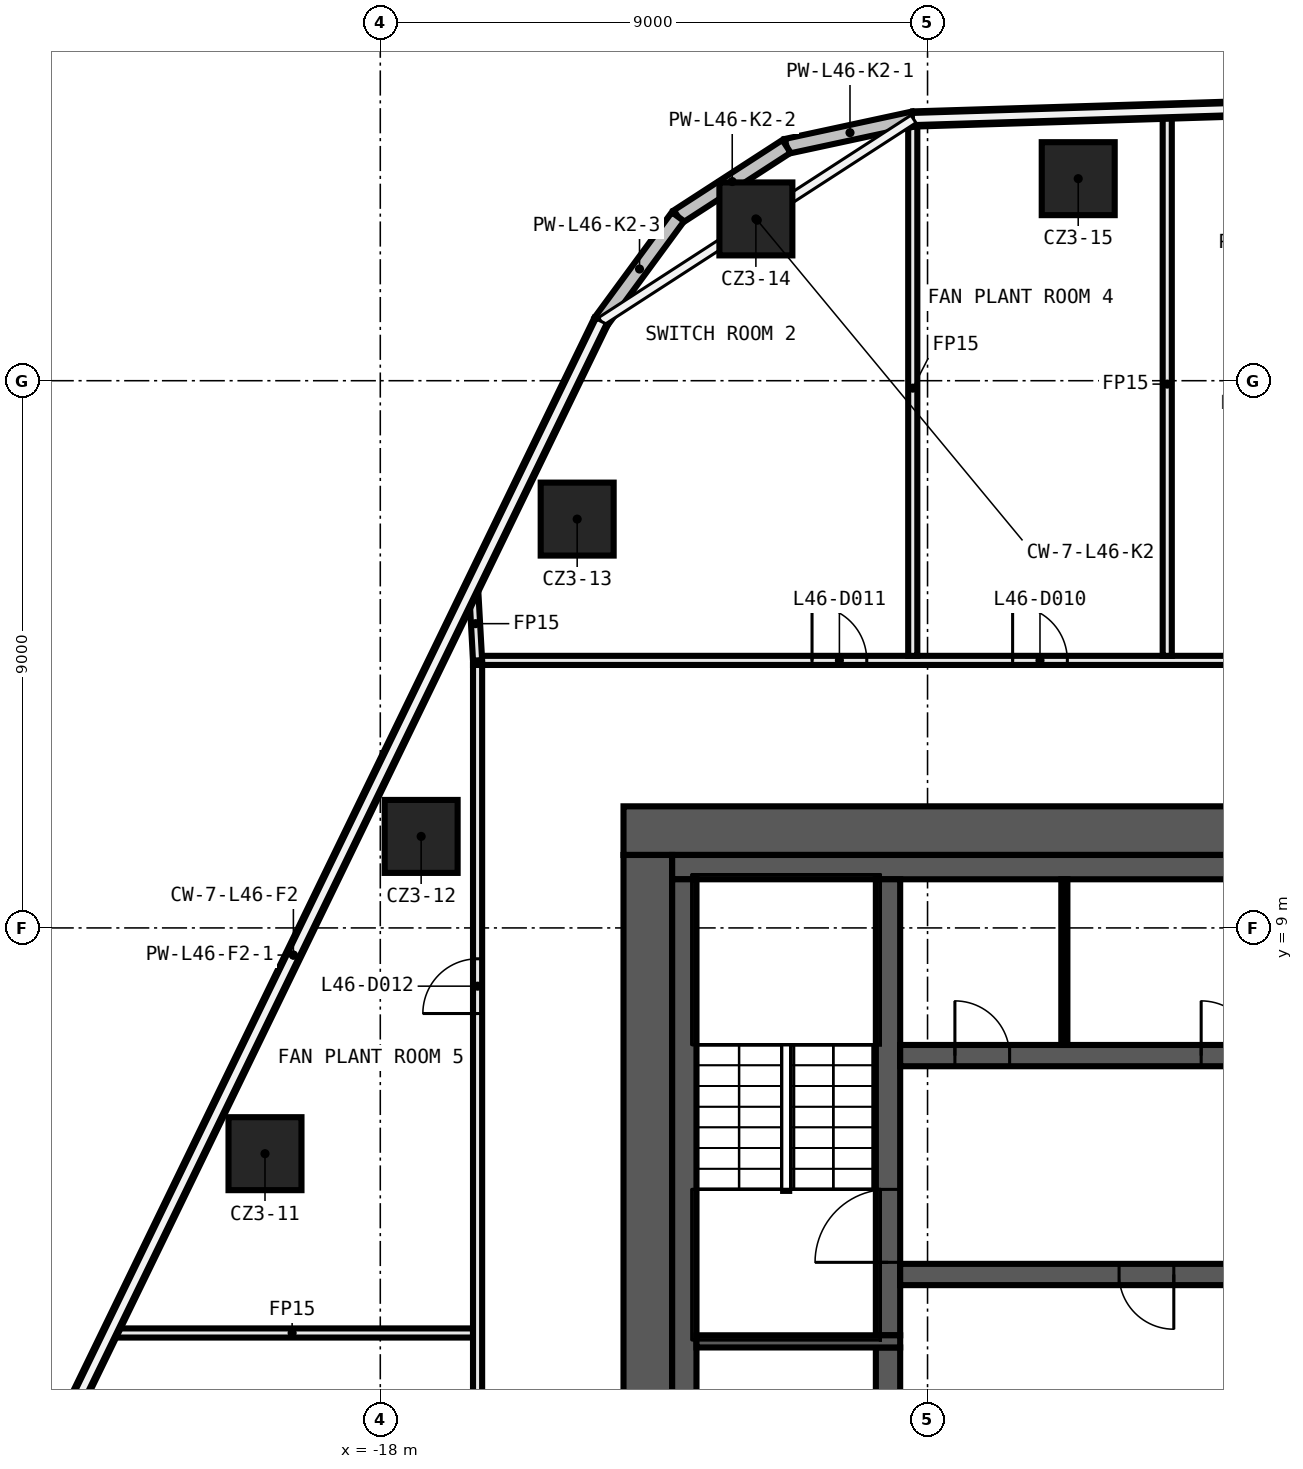
"""IFC4 building model, lengths in metres.
Left out: names, types, materials, properties, quantities, classifications, styles, units other than length and angle.
Written with IfcOpenShell. Run it as: python <this file> out.ifc"""

import sys

from ifc_helpers import new_model, si_unit, direction, frame, frame_2d, origin, origin_2d, place, context, subcontext, project, spatial, rectangle, extrude, element, fill, save


model = new_model("IFC4")
c1 = context("Model", 3, precision=1e-05, world=origin(), true_north=direction((0.0, 1.0)))
c2 = subcontext(c1, "Body", "Model", "MODEL_VIEW")
j1 = project(units=[si_unit("LENGTHUNIT", "METRE"), si_unit("PLANEANGLEUNIT", "RADIAN")], contexts=[c1])
p1 = place(None, origin())
s1 = spatial("IfcSite", under=j1, at=p1, CompositionType="ELEMENT")
p2 = place(p1, origin())
s2 = spatial("IfcBuilding", under=s1, at=p2, CompositionType="ELEMENT")
p3 = place(p2, frame((0.0, 0.0, 220.6)))
s3 = spatial("IfcBuildingStorey", under=s2, at=p3, CompositionType="ELEMENT", Elevation=220.6)
for number, where, z_axis, x_axis in (
    (1, (-19.896, 5.287, 0.0), (0.0, 0.0, 1.0), (1.0, 0.0, 0.0)),
    (2, (-17.328, 10.505, 0.0), (0.0, 0.0, 1.0), (1.0, 0.0, 0.0)),
    (3, (-14.762, 15.724, 0.0), (0.0, 0.0, 1.0), (1.0, 0.0, 0.0)),
    (4, (-11.823, 20.661, 0.0), (0.0, 0.0, 1.0), (1.0, 0.0, 0.0)),
    (5, (-6.522, 21.323, 0.0), (0.0, 0.0, 1.0), (1.0, 0.0, 0.0)),
):
    element("IfcColumn", number, at=place(p3, frame(where, z_axis=z_axis, x_axis=x_axis)), inside=s3, PredefinedType="COLUMN", context=c2, shape_type="SweptSolid", body=[
        extrude(rectangle(XDim=1.2, YDim=1.2, at=origin_2d()), origin(), (0.0, 0.0, 1.0), 7.55),
    ])
p4 = place(p3, frame((-22.425, 2.338, 0.0), z_axis=(0.0, 0.0, 1.0), x_axis=(1.0, 0.0, 0.0)))
e6 = element("IfcWall", 6, at=p4, inside=s3, PredefinedType="PARTITIONING", context=c2, shape_type="SweptSolid", body=[
    extrude(rectangle(XDim=5.949, YDim=0.15, at=frame_2d((2.975, 0.0))), origin(), (0.0, 0.0, 1.0), 7.55),
])
p5 = place(p3, frame((-16.475, 13.4, 0.0), z_axis=(0.0, 0.0, 1.0), x_axis=(1.0, 0.0, 0.0)))
e7 = element("IfcWall", 7, at=p5, inside=s3, PredefinedType="PARTITIONING", context=c2, shape_type="SweptSolid", body=[
    extrude(rectangle(XDim=32.95, YDim=0.15, at=frame_2d((16.475, 0.0))), origin(), (0.0, 0.0, 1.0), 7.55),
])
p6 = place(p5, frame((23.069, 0.0, 0.0)))
e8 = element("IfcOpeningElement", 8, at=p6, cuts=e7, PredefinedType="OPENING", context=c2, shape_type="SweptSolid", body=[
    extrude(rectangle(XDim=0.9, YDim=2.1, at=frame_2d((0.45, 1.05))), frame((0.0, 0.085, 0.0), z_axis=(0.0, -1.0, 0.0), x_axis=(1.0, 0.0, 0.0)), (0.0, 0.0, 1.0), 0.17),
])
p7 = place(p5, frame((17.244, 0.0, 0.0)))
e9 = element("IfcOpeningElement", 9, at=p7, cuts=e7, PredefinedType="OPENING", context=c2, shape_type="SweptSolid", body=[
    extrude(rectangle(XDim=0.9, YDim=2.1, at=frame_2d((0.45, 1.05))), frame((0.0, 0.085, 0.0), z_axis=(0.0, -1.0, 0.0), x_axis=(1.0, 0.0, 0.0)), (0.0, 0.0, 1.0), 0.17),
])
p8 = place(p5, frame((14.382, 0.0, 0.0)))
e10 = element("IfcOpeningElement", 10, at=p8, cuts=e7, PredefinedType="OPENING", context=c2, shape_type="SweptSolid", body=[
    extrude(rectangle(XDim=0.9, YDim=2.1, at=frame_2d((0.45, 1.05))), frame((0.0, 0.085, 0.0), z_axis=(0.0, -1.0, 0.0), x_axis=(1.0, 0.0, 0.0)), (0.0, 0.0, 1.0), 0.17),
])
p9 = place(p5, frame((8.874, 0.0, 0.0)))
e11 = element("IfcOpeningElement", 11, at=p9, cuts=e7, PredefinedType="OPENING", context=c2, shape_type="SweptSolid", body=[
    extrude(rectangle(XDim=0.9, YDim=2.1, at=frame_2d((0.45, 1.05))), frame((0.0, 0.085, 0.0), z_axis=(0.0, -1.0, 0.0), x_axis=(1.0, 0.0, 0.0)), (0.0, 0.0, 1.0), 0.17),
])
p10 = place(p5, frame((5.575, 0.0, 0.0)))
e12 = element("IfcOpeningElement", 12, at=p10, cuts=e7, PredefinedType="OPENING", context=c2, shape_type="SweptSolid", body=[
    extrude(rectangle(XDim=0.9, YDim=2.1, at=frame_2d((0.45, 1.05))), frame((0.0, 0.085, 0.0), z_axis=(0.0, -1.0, 0.0), x_axis=(1.0, 0.0, 0.0)), (0.0, 0.0, 1.0), 0.17),
])
p11 = place(p3, frame((-5.058, 13.475, 0.0), z_axis=(0.0, 0.0, 1.0), x_axis=(0.0, 1.0, 0.0)))
e13 = element("IfcWall", 13, at=p11, inside=s3, PredefinedType="PARTITIONING", context=c2, shape_type="SweptSolid", body=[
    extrude(rectangle(XDim=8.938, YDim=0.15, at=frame_2d((4.469, 0.0))), origin(), (0.0, 0.0, 1.0), 7.55),
])
p12 = place(p3, frame((-9.243, 13.475, 0.0), z_axis=(0.0, 0.0, 1.0), x_axis=(0.0, 1.0, 0.0)))
e14 = element("IfcWall", 14, at=p12, inside=s3, PredefinedType="PARTITIONING", context=c2, shape_type="SweptSolid", body=[
    extrude(rectangle(XDim=8.806, YDim=0.15, at=frame_2d((4.403, 0.0))), origin(), (0.0, 0.0, 1.0), 7.55),
])
p13 = place(p3, frame((-16.4, -13.325, 0.0), z_axis=(0.0, 0.0, 1.0), x_axis=(0.0, 1.0, 0.0)))
e15 = element("IfcWall", 15, at=p13, inside=s3, PredefinedType="PARTITIONING", context=c2, shape_type="SweptSolid", body=[
    extrude(rectangle(XDim=26.65, YDim=0.15, at=frame_2d((13.325, 0.0))), origin(), (0.0, 0.0, 1.0), 7.55),
])
p14 = place(p13, frame((4.958, 0.0, 0.0)))
e16 = element("IfcOpeningElement", 16, at=p14, cuts=e15, PredefinedType="OPENING", context=c2, shape_type="SweptSolid", body=[
    extrude(rectangle(XDim=0.9, YDim=2.1, at=frame_2d((0.45, 1.05))), frame((0.0, 0.085, 0.0), z_axis=(0.0, -1.0, 0.0), x_axis=(1.0, 0.0, 0.0)), (0.0, 0.0, 1.0), 0.17),
])
p15 = place(p13, frame((20.917, 0.0, 0.0)))
e17 = element("IfcOpeningElement", 17, at=p15, cuts=e15, PredefinedType="OPENING", context=c2, shape_type="SweptSolid", body=[
    extrude(rectangle(XDim=0.9, YDim=2.1, at=frame_2d((0.45, 1.05))), frame((0.0, 0.085, 0.0), z_axis=(0.0, -1.0, 0.0), x_axis=(1.0, 0.0, 0.0)), (0.0, 0.0, 1.0), 0.17),
])
p16 = place(p3, frame((-16.467, 14.608, 0.0), z_axis=(0.0, 0.0, 1.0), x_axis=(0.055268927733, -0.998471504665, 0.0)))
e18 = element("IfcWall", 18, at=p16, inside=s3, PredefinedType="PARTITIONING", context=c2, shape_type="SweptSolid", body=[
    extrude(rectangle(XDim=1.21, YDim=0.15, at=frame_2d((0.605, 0.0))), origin(), (0.0, 0.0, 1.0), 7.55),
])
p17 = place(p3, frame((7.493, 22.822, 0.0), z_axis=(0.0, 0.0, 1.0), x_axis=(-0.999520551637, -0.030962345779, 0.0)))
e19 = element("IfcWall", 19, at=p17, inside=s3, PredefinedType="SOLIDWALL", context=c2, shape_type="SweptSolid", body=[
    extrude(rectangle(XDim=16.732, YDim=0.25, at=frame_2d((8.366, 0.0))), origin(), (0.0, 0.0, 1.0), 7.55),
])
p18 = place(p3, frame((-9.231, 22.304, 0.0), z_axis=(0.0, 0.0, 1.0), x_axis=(-0.97756766499, -0.210621604697, 0.0)))
e20 = element("IfcWall", 20, at=p18, inside=s3, PredefinedType="SOLIDWALL", context=c2, shape_type="SweptSolid", body=[
    extrude(rectangle(XDim=2.136, YDim=0.25, at=frame_2d((1.068, 0.0))), origin(), (0.0, 0.0, 1.0), 7.55),
])
p19 = place(p3, frame((-11.319, 21.854, 0.0), z_axis=(0.0, 0.0, 1.0), x_axis=(-0.839218944968, -0.543793676321, 0.0)))
e21 = element("IfcWall", 21, at=p19, inside=s3, PredefinedType="SOLIDWALL", context=c2, shape_type="SweptSolid", body=[
    extrude(rectangle(XDim=2.127, YDim=0.25, at=frame_2d((1.063, 0.0))), origin(), (0.0, 0.0, 1.0), 7.55),
])
p20 = place(p3, frame((-13.104, 20.698, 0.0), z_axis=(0.0, 0.0, 1.0), x_axis=(-0.591868900616, -0.80603424523, 0.0)))
e22 = element("IfcWall", 22, at=p20, inside=s3, PredefinedType="SOLIDWALL", context=c2, shape_type="SweptSolid", body=[
    extrude(rectangle(XDim=2.136, YDim=0.25, at=frame_2d((1.068, 0.0))), origin(), (0.0, 0.0, 1.0), 7.55),
])
p21 = place(p3, frame((-14.369, 18.976, 0.0), z_axis=(0.0, 0.0, 1.0), x_axis=(-0.436764875806, -0.899575701796, 0.0)))
e23 = element("IfcWall", 23, at=p21, inside=s3, PredefinedType="SOLIDWALL", context=c2, shape_type="SweptSolid", body=[
    extrude(rectangle(XDim=23.171, YDim=0.25, at=frame_2d((11.585, 0.0))), origin(), (0.0, 0.0, 1.0), 7.55),
])
p22 = place(p3, frame((-14.0, 10.6, 0.0), z_axis=(0.0, 0.0, 1.0), x_axis=(1.0, 0.0, 0.0)))
e24 = element("IfcWall", 24, at=p22, inside=s3, PredefinedType="SHEAR", context=c2, shape_type="SweptSolid", body=[
    extrude(rectangle(XDim=28.0, YDim=0.8, at=frame_2d((14.0, 0.0))), origin(), (0.0, 0.0, 1.0), 7.55),
])
p23 = place(p22, frame((15.9, 0.0, 0.0)))
e25 = element("IfcOpeningElement", 25, at=p23, cuts=e24, PredefinedType="OPENING", context=c2, shape_type="SweptSolid", body=[
    extrude(rectangle(XDim=1.6, YDim=2.1, at=frame_2d((0.8, 1.05))), frame((0.0, 0.41, 0.0), z_axis=(0.0, -1.0, 0.0), x_axis=(1.0, 0.0, 0.0)), (0.0, 0.0, 1.0), 0.82),
])
p24 = place(p3, frame((-13.6, -10.2, 0.0), z_axis=(0.0, 0.0, 1.0), x_axis=(0.0, 1.0, 0.0)))
e26 = element("IfcWall", 26, at=p24, inside=s3, PredefinedType="SHEAR", context=c2, shape_type="SweptSolid", body=[
    extrude(rectangle(XDim=20.4, YDim=0.8, at=frame_2d((10.2, 0.0))), origin(), (0.0, 0.0, 1.0), 7.55),
])
p25 = place(p3, frame((-13.2, 10.0, 0.0), z_axis=(0.0, 0.0, 1.0), x_axis=(1.0, 0.0, 0.0)))
e27 = element("IfcWall", 27, at=p25, inside=s3, PredefinedType="SHEAR", context=c2, shape_type="SweptSolid", body=[
    extrude(rectangle(XDim=14.7, YDim=0.4, at=frame_2d((7.35, 0.0))), origin(), (0.0, 0.0, 1.0), 7.55),
])
p26 = place(p3, frame((-13.0, -9.8, 0.0), z_axis=(0.0, 0.0, 1.0), x_axis=(0.0, 1.0, 0.0)))
e28 = element("IfcWall", 28, at=p26, inside=s3, PredefinedType="SHEAR", context=c2, shape_type="SweptSolid", body=[
    extrude(rectangle(XDim=19.6, YDim=0.4, at=frame_2d((9.8, 0.0))), origin(), (0.0, 0.0, 1.0), 7.55),
])
p27 = place(p3, frame((-9.65, -2.1, 0.0), z_axis=(0.0, 0.0, 1.0), x_axis=(0.0, 1.0, 0.0)))
e29 = element("IfcWall", 29, at=p27, inside=s3, PredefinedType="SHEAR", context=c2, shape_type="SweptSolid", body=[
    extrude(rectangle(XDim=4.2, YDim=0.4, at=frame_2d((2.1, 0.0))), origin(), (0.0, 0.0, 1.0), 7.55),
])
p28 = place(p3, frame((-9.65, 2.3, 0.0), z_axis=(0.0, 0.0, 1.0), x_axis=(0.0, 1.0, 0.0)))
e30 = element("IfcWall", 30, at=p28, inside=s3, PredefinedType="SHEAR", context=c2, shape_type="SweptSolid", body=[
    extrude(rectangle(XDim=7.5, YDim=0.4, at=frame_2d((3.75, 0.0))), origin(), (0.0, 0.0, 1.0), 7.55),
])
p29 = place(p28, frame((1.2, 0.0, 0.0)))
e31 = element("IfcOpeningElement", 31, at=p29, cuts=e30, PredefinedType="OPENING", context=c2, shape_type="SweptSolid", body=[
    extrude(rectangle(XDim=1.2, YDim=2.1, at=frame_2d((0.6, 1.05))), frame((0.0, 0.21, 0.0), z_axis=(0.0, -1.0, 0.0), x_axis=(1.0, 0.0, 0.0)), (0.0, 0.0, 1.0), 0.42),
])
p30 = place(p3, frame((-9.45, 2.2, 0.0), z_axis=(0.0, 0.0, 1.0), x_axis=(-1.0, 0.0, 0.0)))
e32 = element("IfcWall", 32, at=p30, inside=s3, PredefinedType="SHEAR", context=c2, shape_type="SweptSolid", body=[
    extrude(rectangle(XDim=3.35, YDim=0.2, at=frame_2d((1.675, 0.0))), origin(), (0.0, 0.0, 1.0), 7.55),
])
p31 = place(p3, frame((-9.45, 6.9, 0.0), z_axis=(0.0, 0.0, 1.0), x_axis=(1.0, 0.0, 0.0)))
e33 = element("IfcWall", 33, at=p31, inside=s3, PredefinedType="SHEAR", context=c2, shape_type="SweptSolid", body=[
    extrude(rectangle(XDim=18.9, YDim=0.35, at=frame_2d((9.45, 0.0))), origin(), (0.0, 0.0, 1.0), 7.55),
])
p32 = place(p31, frame((11.55, 0.0, 0.0)))
e34 = element("IfcOpeningElement", 34, at=p32, cuts=e33, PredefinedType="OPENING", context=c2, shape_type="SweptSolid", body=[
    extrude(rectangle(XDim=1.2, YDim=2.1, at=frame_2d((0.6, 1.05))), frame((0.0, 0.185, 0.0), z_axis=(0.0, -1.0, 0.0), x_axis=(1.0, 0.0, 0.0)), (0.0, 0.0, 1.0), 0.37),
])
p33 = place(p31, frame((14.3, 0.0, 0.0)))
e35 = element("IfcOpeningElement", 35, at=p33, cuts=e33, PredefinedType="OPENING", context=c2, shape_type="SweptSolid", body=[
    extrude(rectangle(XDim=1.1, YDim=2.1, at=frame_2d((0.55, 1.05))), frame((0.0, 0.185, 0.0), z_axis=(0.0, -1.0, 0.0), x_axis=(1.0, 0.0, 0.0)), (0.0, 0.0, 1.0), 0.37),
])
p34 = place(p31, frame((17.0, 0.0, 0.0)))
e36 = element("IfcOpeningElement", 36, at=p34, cuts=e33, PredefinedType="OPENING", context=c2, shape_type="SweptSolid", body=[
    extrude(rectangle(XDim=1.1, YDim=2.1, at=frame_2d((0.55, 1.05))), frame((0.0, 0.185, 0.0), z_axis=(0.0, -1.0, 0.0), x_axis=(1.0, 0.0, 0.0)), (0.0, 0.0, 1.0), 0.37),
])
p35 = place(p31, frame((0.9, 0.0, 0.0)))
e37 = element("IfcOpeningElement", 37, at=p35, cuts=e33, PredefinedType="OPENING", context=c2, shape_type="SweptSolid", body=[
    extrude(rectangle(XDim=0.9, YDim=2.1, at=frame_2d((0.45, 1.05))), frame((0.0, 0.185, 0.0), z_axis=(0.0, -1.0, 0.0), x_axis=(1.0, 0.0, 0.0)), (0.0, 0.0, 1.0), 0.37),
])
p36 = place(p31, frame((4.95, 0.0, 0.0)))
e38 = element("IfcOpeningElement", 38, at=p36, cuts=e33, PredefinedType="OPENING", context=c2, shape_type="SweptSolid", body=[
    extrude(rectangle(XDim=0.9, YDim=2.1, at=frame_2d((0.45, 1.05))), frame((0.0, 0.185, 0.0), z_axis=(0.0, -1.0, 0.0), x_axis=(1.0, 0.0, 0.0)), (0.0, 0.0, 1.0), 0.37),
])
p37 = place(p31, frame((9.0, 0.0, 0.0)))
e39 = element("IfcOpeningElement", 39, at=p37, cuts=e33, PredefinedType="OPENING", context=c2, shape_type="SweptSolid", body=[
    extrude(rectangle(XDim=0.9, YDim=2.1, at=frame_2d((0.45, 1.05))), frame((0.0, 0.185, 0.0), z_axis=(0.0, -1.0, 0.0), x_axis=(1.0, 0.0, 0.0)), (0.0, 0.0, 1.0), 0.37),
])
p38 = place(p3, frame((9.45, 3.3, 0.0), z_axis=(0.0, 0.0, 1.0), x_axis=(-1.0, 0.0, 0.0)))
e40 = element("IfcWall", 40, at=p38, inside=s3, PredefinedType="SHEAR", context=c2, shape_type="SweptSolid", body=[
    extrude(rectangle(XDim=18.9, YDim=0.35, at=frame_2d((9.45, 0.0))), origin(), (0.0, 0.0, 1.0), 7.55),
])
p39 = place(p38, frame((6.2, 0.0, 0.0)))
e41 = element("IfcOpeningElement", 41, at=p39, cuts=e40, PredefinedType="OPENING", context=c2, shape_type="SweptSolid", body=[
    extrude(rectangle(XDim=1.1, YDim=2.1, at=frame_2d((0.55, 1.05))), frame((0.0, 0.185, 0.0), z_axis=(0.0, -1.0, 0.0), x_axis=(1.0, 0.0, 0.0)), (0.0, 0.0, 1.0), 0.37),
])
p40 = place(p38, frame((3.5, 0.0, 0.0)))
e42 = element("IfcOpeningElement", 42, at=p40, cuts=e40, PredefinedType="OPENING", context=c2, shape_type="SweptSolid", body=[
    extrude(rectangle(XDim=1.1, YDim=2.1, at=frame_2d((0.55, 1.05))), frame((0.0, 0.185, 0.0), z_axis=(0.0, -1.0, 0.0), x_axis=(1.0, 0.0, 0.0)), (0.0, 0.0, 1.0), 0.37),
])
p41 = place(p38, frame((0.9, 0.0, 0.0)))
e43 = element("IfcOpeningElement", 43, at=p41, cuts=e40, PredefinedType="OPENING", context=c2, shape_type="SweptSolid", body=[
    extrude(rectangle(XDim=0.9, YDim=2.1, at=frame_2d((0.45, 1.05))), frame((0.0, 0.185, 0.0), z_axis=(0.0, -1.0, 0.0), x_axis=(1.0, 0.0, 0.0)), (0.0, 0.0, 1.0), 0.37),
])
p42 = place(p38, frame((14.4, 0.0, 0.0)))
e44 = element("IfcOpeningElement", 44, at=p42, cuts=e40, PredefinedType="OPENING", context=c2, shape_type="SweptSolid", body=[
    extrude(rectangle(XDim=0.9, YDim=2.1, at=frame_2d((0.45, 1.05))), frame((0.0, 0.185, 0.0), z_axis=(0.0, -1.0, 0.0), x_axis=(1.0, 0.0, 0.0)), (0.0, 0.0, 1.0), 0.37),
])
p43 = place(p38, frame((9.0, 0.0, 0.0)))
e45 = element("IfcOpeningElement", 45, at=p43, cuts=e40, PredefinedType="OPENING", context=c2, shape_type="SweptSolid", body=[
    extrude(rectangle(XDim=0.9, YDim=2.1, at=frame_2d((0.45, 1.05))), frame((0.0, 0.185, 0.0), z_axis=(0.0, -1.0, 0.0), x_axis=(1.0, 0.0, 0.0)), (0.0, 0.0, 1.0), 0.37),
])
p44 = place(p3, frame((-6.75, 7.075, 0.0), z_axis=(0.0, 0.0, 1.0), x_axis=(0.0, 1.0, 0.0)))
e46 = element("IfcWall", 46, at=p44, inside=s3, PredefinedType="PARTITIONING", context=c2, shape_type="SweptSolid", body=[
    extrude(rectangle(XDim=2.725, YDim=0.1, at=frame_2d((1.363, 0.0))), origin(), (0.0, 0.0, 1.0), 7.55),
])
p45 = place(p9, origin())
e47 = element("IfcDoor", 47, at=p45, inside=s3, OperationType="SINGLE_SWING_LEFT", PredefinedType="DOOR", context=c2, shape_type="SweptSolid", body=[
    extrude(rectangle(XDim=0.9, YDim=2.1, at=frame_2d((0.45, 1.05))), frame((0.0, 0.025, 0.0), z_axis=(0.0, -1.0, 0.0), x_axis=(1.0, 0.0, 0.0)), (0.0, 0.0, 1.0), 0.05),
])
fill(e11, e47)
p46 = place(p10, origin())
e48 = element("IfcDoor", 48, at=p46, inside=s3, OperationType="SINGLE_SWING_RIGHT", PredefinedType="DOOR", context=c2, shape_type="SweptSolid", body=[
    extrude(rectangle(XDim=0.9, YDim=2.1, at=frame_2d((0.45, 1.05))), frame((0.0, 0.025, 0.0), z_axis=(0.0, -1.0, 0.0), x_axis=(1.0, 0.0, 0.0)), (0.0, 0.0, 1.0), 0.05),
])
fill(e12, e48)
p47 = place(p15, origin())
e49 = element("IfcDoor", 49, at=p47, inside=s3, OperationType="SINGLE_SWING_LEFT", PredefinedType="DOOR", context=c2, shape_type="SweptSolid", body=[
    extrude(rectangle(XDim=0.9, YDim=2.1, at=frame_2d((0.45, 1.05))), frame((0.0, 0.025, 0.0), z_axis=(0.0, -1.0, 0.0), x_axis=(1.0, 0.0, 0.0)), (0.0, 0.0, 1.0), 0.05),
])
fill(e17, e49)
p48 = place(p35, origin())
e50 = element("IfcDoor", 50, at=p48, inside=s3, OperationType="SINGLE_SWING_RIGHT", PredefinedType="DOOR", context=c2, shape_type="SweptSolid", body=[
    extrude(rectangle(XDim=0.9, YDim=2.1, at=frame_2d((0.45, 1.05))), frame((0.0, 0.025, 0.0), z_axis=(0.0, -1.0, 0.0), x_axis=(1.0, 0.0, 0.0)), (0.0, 0.0, 1.0), 0.05),
])
fill(e37, e50)
p49 = place(p36, origin())
e51 = element("IfcDoor", 51, at=p49, inside=s3, OperationType="SINGLE_SWING_LEFT", PredefinedType="DOOR", context=c2, shape_type="SweptSolid", body=[
    extrude(rectangle(XDim=0.9, YDim=2.1, at=frame_2d((0.45, 1.05))), frame((0.0, 0.025, 0.0), z_axis=(0.0, -1.0, 0.0), x_axis=(1.0, 0.0, 0.0)), (0.0, 0.0, 1.0), 0.05),
])
fill(e38, e51)
p50 = place(p42, origin())
e52 = element("IfcDoor", 52, at=p50, inside=s3, OperationType="SINGLE_SWING_LEFT", PredefinedType="DOOR", context=c2, shape_type="SweptSolid", body=[
    extrude(rectangle(XDim=0.9, YDim=2.1, at=frame_2d((0.45, 1.05))), frame((0.0, 0.025, 0.0), z_axis=(0.0, -1.0, 0.0), x_axis=(1.0, 0.0, 0.0)), (0.0, 0.0, 1.0), 0.05),
])
fill(e44, e52)
p51 = place(p29, origin())
e53 = element("IfcDoor", 53, at=p51, inside=s3, OperationType="SINGLE_SWING_RIGHT", PredefinedType="DOOR", context=c2, shape_type="SweptSolid", body=[
    extrude(rectangle(XDim=1.2, YDim=2.1, at=frame_2d((0.6, 1.05))), frame((0.0, 0.025, 0.0), z_axis=(0.0, -1.0, 0.0), x_axis=(1.0, 0.0, 0.0)), (0.0, 0.0, 1.0), 0.05),
])
fill(e31, e53)
save(model, sys.argv[1])
